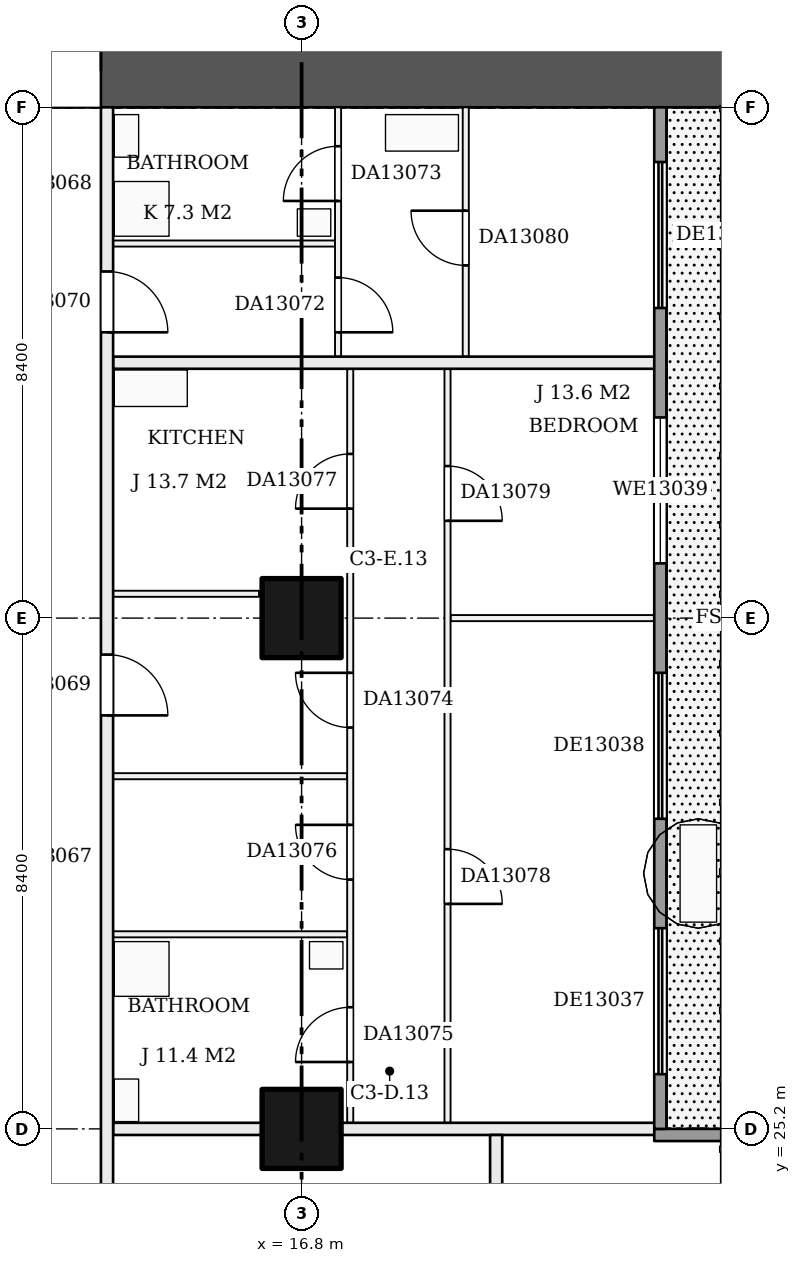
"""IFC4 building model, lengths in metres.
Left out: names, types, materials, properties, quantities, classifications, styles, units other than length and angle.
Written with IfcOpenShell. Run it as: python <this file> out.ifc"""

import sys

from ifc_helpers import new_model, si_unit, direction, frame, frame_2d, origin, origin_2d, place, context, subcontext, project, spatial, rectangle, extrude, element, fill, save


model = new_model("IFC4")
c1 = context("Model", 3, precision=1e-05, world=origin(), true_north=direction((0.0, 1.0)))
c2 = subcontext(c1, "Body", "Model", "MODEL_VIEW")
j1 = project(units=[si_unit("LENGTHUNIT", "METRE"), si_unit("PLANEANGLEUNIT", "RADIAN")], contexts=[c1])
p1 = place(None, origin())
s1 = spatial("IfcSite", under=j1, at=p1, CompositionType="ELEMENT")
p2 = place(p1, origin())
s2 = spatial("IfcBuilding", under=s1, at=p2, CompositionType="ELEMENT")
p3 = place(p2, frame((0.0, 0.0, 56.7)))
s3 = spatial("IfcBuildingStorey", under=s2, at=p3, CompositionType="ELEMENT", Elevation=56.7)
for number, where, z_axis, x_axis in (
    (1, (16.8, 25.2, 0.0), (0.0, 0.0, 1.0), (1.0, 0.0, 0.0)),
    (2, (16.8, 33.6, 0.0), (0.0, 0.0, 1.0), (1.0, 0.0, 0.0)),
):
    element("IfcColumn", number, at=place(p3, frame(where, z_axis=z_axis, x_axis=x_axis)), inside=s3, PredefinedType="COLUMN", context=c2, shape_type="SweptSolid", body=[
        extrude(rectangle(XDim=1.3, YDim=1.3, at=origin_2d()), origin(), (0.0, 0.0, 1.0), 3.22),
    ])
p4 = place(p3, frame((9.6, 42.6, 0.0), z_axis=(0.0, 0.0, 1.0), x_axis=(1.0, 0.0, 0.0)))
e3 = element("IfcWall", 3, at=p4, inside=s3, PredefinedType="SHEAR", context=c2, shape_type="SweptSolid", body=[
    extrude(rectangle(XDim=14.4, YDim=1.2, at=frame_2d((7.2, 0.0))), origin(), (0.0, 0.0, 1.0), 3.22),
])
p5 = place(p4, frame((2.1, 0.0, 0.0)))
e4 = element("IfcOpeningElement", 4, at=p5, cuts=e3, PredefinedType="OPENING", context=c2, shape_type="SweptSolid", body=[
    extrude(rectangle(XDim=1.8, YDim=2.1, at=frame_2d((0.9, 1.05))), frame((0.0, 0.61, 0.0), z_axis=(0.0, -1.0, 0.0), x_axis=(1.0, 0.0, 0.0)), (0.0, 0.0, 1.0), 1.22),
])
p6 = place(p3, frame((13.7, 25.2, 0.0), z_axis=(0.0, 0.0, 1.0), x_axis=(1.0, 0.0, 0.0)))
e5 = element("IfcWall", 5, at=p6, inside=s3, PredefinedType="PARTITIONING", context=c2, shape_type="SweptSolid", body=[
    extrude(rectangle(XDim=9.0, YDim=0.2, at=frame_2d((4.5, 0.0))), origin(), (0.0, 0.0, 1.0), 3.22),
])
for number, where, z_axis, x_axis in (
    (6, (13.7, 28.4, 0.0), (0.0, 0.0, 1.0), (1.0, 0.0, 0.0)),
    (7, (13.7, 31.0, 0.0), (0.0, 0.0, 1.0), (1.0, 0.0, 0.0)),
):
    element("IfcWall", number, at=place(p3, frame(where, z_axis=z_axis, x_axis=x_axis)), inside=s3, PredefinedType="PARTITIONING", context=c2, shape_type="SweptSolid", body=[
        extrude(rectangle(XDim=3.85, YDim=0.1, at=frame_2d((1.925, 0.0))), origin(), (0.0, 0.0, 1.0), 3.22),
    ])
p7 = place(p3, frame((19.25, 33.6, 0.0), z_axis=(0.0, 0.0, 1.0), x_axis=(1.0, 0.0, 0.0)))
e8 = element("IfcWall", 8, at=p7, inside=s3, PredefinedType="PARTITIONING", context=c2, shape_type="SweptSolid", body=[
    extrude(rectangle(XDim=3.45, YDim=0.1, at=frame_2d((1.725, 0.0))), origin(), (0.0, 0.0, 1.0), 3.22),
])
p8 = place(p3, frame((13.7, 34.0, 0.0), z_axis=(0.0, 0.0, 1.0), x_axis=(1.0, 0.0, 0.0)))
e9 = element("IfcWall", 9, at=p8, inside=s3, PredefinedType="PARTITIONING", context=c2, shape_type="SweptSolid", body=[
    extrude(rectangle(XDim=2.4, YDim=0.1, at=frame_2d((1.2, 0.0))), origin(), (0.0, 0.0, 1.0), 3.22),
])
p9 = place(p3, frame((13.7, 37.8, 0.0), z_axis=(0.0, 0.0, 1.0), x_axis=(1.0, 0.0, 0.0)))
e10 = element("IfcWall", 10, at=p9, inside=s3, PredefinedType="PARTITIONING", context=c2, shape_type="SweptSolid", body=[
    extrude(rectangle(XDim=9.0, YDim=0.2, at=frame_2d((4.5, 0.0))), origin(), (0.0, 0.0, 1.0), 3.22),
])
p10 = place(p3, frame((13.7, 39.76, 0.0), z_axis=(0.0, 0.0, 1.0), x_axis=(1.0, 0.0, 0.0)))
e11 = element("IfcWall", 11, at=p10, inside=s3, PredefinedType="PARTITIONING", context=c2, shape_type="SweptSolid", body=[
    extrude(rectangle(XDim=3.65, YDim=0.1, at=frame_2d((1.825, 0.0))), origin(), (0.0, 0.0, 1.0), 3.22),
])
p11 = place(p3, frame((13.6, 20.8, 0.0), z_axis=(0.0, 0.0, 1.0), x_axis=(0.0, 1.0, 0.0)))
e12 = element("IfcWall", 12, at=p11, inside=s3, PredefinedType="PARTITIONING", context=c2, shape_type="SweptSolid", body=[
    extrude(rectangle(XDim=21.2, YDim=0.2, at=frame_2d((10.6, 0.0))), origin(), (0.0, 0.0, 1.0), 3.22),
])
p12 = place(p11, frame((11.2, 0.0, 0.0)))
e13 = element("IfcOpeningElement", 13, at=p12, cuts=e12, PredefinedType="OPENING", context=c2, shape_type="SweptSolid", body=[
    extrude(rectangle(XDim=1.0, YDim=2.1, at=frame_2d((0.5, 1.05))), frame((0.0, 0.11, 0.0), z_axis=(0.0, -1.0, 0.0), x_axis=(1.0, 0.0, 0.0)), (0.0, 0.0, 1.0), 0.22),
])
p13 = place(p11, frame((17.5, 0.0, 0.0)))
e14 = element("IfcOpeningElement", 14, at=p13, cuts=e12, PredefinedType="OPENING", context=c2, shape_type="SweptSolid", body=[
    extrude(rectangle(XDim=1.0, YDim=2.1, at=frame_2d((0.5, 1.05))), frame((0.0, 0.11, 0.0), z_axis=(0.0, -1.0, 0.0), x_axis=(1.0, 0.0, 0.0)), (0.0, 0.0, 1.0), 0.22),
])
p14 = place(p11, frame((1.7, 0.0, 0.0)))
e15 = element("IfcOpeningElement", 15, at=p14, cuts=e12, PredefinedType="OPENING", context=c2, shape_type="SweptSolid", body=[
    extrude(rectangle(XDim=1.0, YDim=2.1, at=frame_2d((0.5, 1.05))), frame((0.0, 0.11, 0.0), z_axis=(0.0, -1.0, 0.0), x_axis=(1.0, 0.0, 0.0)), (0.0, 0.0, 1.0), 0.22),
])
p15 = place(p3, frame((17.4, 37.9, 0.0), z_axis=(0.0, 0.0, 1.0), x_axis=(0.0, 1.0, 0.0)))
e16 = element("IfcWall", 16, at=p15, inside=s3, PredefinedType="PARTITIONING", context=c2, shape_type="SweptSolid", body=[
    extrude(rectangle(XDim=4.1, YDim=0.1, at=frame_2d((2.05, 0.0))), origin(), (0.0, 0.0, 1.0), 3.22),
])
p16 = place(p15, frame((0.4, 0.0, 0.0)))
e17 = element("IfcOpeningElement", 17, at=p16, cuts=e16, PredefinedType="OPENING", context=c2, shape_type="SweptSolid", body=[
    extrude(rectangle(XDim=0.9, YDim=2.1, at=frame_2d((0.45, 1.05))), frame((0.0, 0.06, 0.0), z_axis=(0.0, -1.0, 0.0), x_axis=(1.0, 0.0, 0.0)), (0.0, 0.0, 1.0), 0.12),
])
p17 = place(p15, frame((2.56, 0.0, 0.0)))
e18 = element("IfcOpeningElement", 18, at=p17, cuts=e16, PredefinedType="OPENING", context=c2, shape_type="SweptSolid", body=[
    extrude(rectangle(XDim=0.9, YDim=2.1, at=frame_2d((0.45, 1.05))), frame((0.0, 0.06, 0.0), z_axis=(0.0, -1.0, 0.0), x_axis=(1.0, 0.0, 0.0)), (0.0, 0.0, 1.0), 0.12),
])
p18 = place(p3, frame((17.6, 25.3, 0.0), z_axis=(0.0, 0.0, 1.0), x_axis=(0.0, 1.0, 0.0)))
e19 = element("IfcWall", 19, at=p18, inside=s3, PredefinedType="PARTITIONING", context=c2, shape_type="SweptSolid", body=[
    extrude(rectangle(XDim=12.4, YDim=0.1, at=frame_2d((6.2, 0.0))), origin(), (0.0, 0.0, 1.0), 3.22),
])
p19 = place(p18, frame((6.5, 0.0, 0.0)))
e20 = element("IfcOpeningElement", 20, at=p19, cuts=e19, PredefinedType="OPENING", context=c2, shape_type="SweptSolid", body=[
    extrude(rectangle(XDim=0.9, YDim=2.1, at=frame_2d((0.45, 1.05))), frame((0.0, 0.06, 0.0), z_axis=(0.0, -1.0, 0.0), x_axis=(1.0, 0.0, 0.0)), (0.0, 0.0, 1.0), 0.12),
])
p20 = place(p18, frame((1.0, 0.0, 0.0)))
e21 = element("IfcOpeningElement", 21, at=p20, cuts=e19, PredefinedType="OPENING", context=c2, shape_type="SweptSolid", body=[
    extrude(rectangle(XDim=0.9, YDim=2.1, at=frame_2d((0.45, 1.05))), frame((0.0, 0.06, 0.0), z_axis=(0.0, -1.0, 0.0), x_axis=(1.0, 0.0, 0.0)), (0.0, 0.0, 1.0), 0.12),
])
p21 = place(p18, frame((4.0, 0.0, 0.0)))
e22 = element("IfcOpeningElement", 22, at=p21, cuts=e19, PredefinedType="OPENING", context=c2, shape_type="SweptSolid", body=[
    extrude(rectangle(XDim=0.9, YDim=2.1, at=frame_2d((0.45, 1.05))), frame((0.0, 0.06, 0.0), z_axis=(0.0, -1.0, 0.0), x_axis=(1.0, 0.0, 0.0)), (0.0, 0.0, 1.0), 0.12),
])
p22 = place(p18, frame((10.1, 0.0, 0.0)))
e23 = element("IfcOpeningElement", 23, at=p22, cuts=e19, PredefinedType="OPENING", context=c2, shape_type="SweptSolid", body=[
    extrude(rectangle(XDim=0.9, YDim=2.1, at=frame_2d((0.45, 1.05))), frame((0.0, 0.06, 0.0), z_axis=(0.0, -1.0, 0.0), x_axis=(1.0, 0.0, 0.0)), (0.0, 0.0, 1.0), 0.12),
])
p23 = place(p3, frame((19.2, 25.3, 0.0), z_axis=(0.0, 0.0, 1.0), x_axis=(0.0, 1.0, 0.0)))
e24 = element("IfcWall", 24, at=p23, inside=s3, PredefinedType="PARTITIONING", context=c2, shape_type="SweptSolid", body=[
    extrude(rectangle(XDim=12.4, YDim=0.1, at=frame_2d((6.2, 0.0))), origin(), (0.0, 0.0, 1.0), 3.22),
])
p24 = place(p23, frame((3.6, 0.0, 0.0)))
e25 = element("IfcOpeningElement", 25, at=p24, cuts=e24, PredefinedType="OPENING", context=c2, shape_type="SweptSolid", body=[
    extrude(rectangle(XDim=0.9, YDim=2.1, at=frame_2d((0.45, 1.05))), frame((0.0, 0.06, 0.0), z_axis=(0.0, -1.0, 0.0), x_axis=(1.0, 0.0, 0.0)), (0.0, 0.0, 1.0), 0.12),
])
p25 = place(p23, frame((9.9, 0.0, 0.0)))
e26 = element("IfcOpeningElement", 26, at=p25, cuts=e24, PredefinedType="OPENING", context=c2, shape_type="SweptSolid", body=[
    extrude(rectangle(XDim=0.9, YDim=2.1, at=frame_2d((0.45, 1.05))), frame((0.0, 0.06, 0.0), z_axis=(0.0, -1.0, 0.0), x_axis=(1.0, 0.0, 0.0)), (0.0, 0.0, 1.0), 0.12),
])
p26 = place(p3, frame((19.5, 37.9, 0.0), z_axis=(0.0, 0.0, 1.0), x_axis=(0.0, 1.0, 0.0)))
e27 = element("IfcWall", 27, at=p26, inside=s3, PredefinedType="PARTITIONING", context=c2, shape_type="SweptSolid", body=[
    extrude(rectangle(XDim=4.1, YDim=0.1, at=frame_2d((2.05, 0.0))), origin(), (0.0, 0.0, 1.0), 3.22),
])
p27 = place(p26, frame((1.5, 0.0, 0.0)))
e28 = element("IfcOpeningElement", 28, at=p27, cuts=e27, PredefinedType="OPENING", context=c2, shape_type="SweptSolid", body=[
    extrude(rectangle(XDim=0.9, YDim=2.1, at=frame_2d((0.45, 1.05))), frame((0.0, 0.06, 0.0), z_axis=(0.0, -1.0, 0.0), x_axis=(1.0, 0.0, 0.0)), (0.0, 0.0, 1.0), 0.12),
])
p28 = place(p3, frame((20.0, 13.7, 0.0), z_axis=(0.0, 0.0, 1.0), x_axis=(0.0, 1.0, 0.0)))
e29 = element("IfcWall", 29, at=p28, inside=s3, PredefinedType="PARTITIONING", context=c2, shape_type="SweptSolid", body=[
    extrude(rectangle(XDim=11.4, YDim=0.2, at=frame_2d((5.7, 0.0))), origin(), (0.0, 0.0, 1.0), 3.22),
])
p29 = place(p3, frame((24.5, 25.1, 0.0), z_axis=(0.0, 0.0, 1.0), x_axis=(-1.0, 0.0, 0.0)))
e30 = element("IfcWall", 30, at=p29, inside=s3, PredefinedType="SOLIDWALL", context=c2, shape_type="SweptSolid", body=[
    extrude(rectangle(XDim=1.9, YDim=0.2, at=frame_2d((0.95, 0.0))), origin(), (0.0, 0.0, 1.0), 3.22),
])
p30 = place(p3, frame((22.7, 25.2, 0.0), z_axis=(0.0, 0.0, 1.0), x_axis=(0.0, 1.0, 0.0)))
e31 = element("IfcWall", 31, at=p30, inside=s3, PredefinedType="SOLIDWALL", context=c2, shape_type="SweptSolid", body=[
    extrude(rectangle(XDim=16.8, YDim=0.2, at=frame_2d((8.4, 0.0))), origin(), (0.0, 0.0, 1.0), 3.22),
])
p31 = place(p30, frame((0.9, 0.0, 0.0)))
e32 = element("IfcOpeningElement", 32, at=p31, cuts=e31, PredefinedType="OPENING", context=c2, shape_type="SweptSolid", body=[
    extrude(rectangle(XDim=2.4, YDim=2.2, at=frame_2d((1.2, 1.1))), frame((0.0, 0.11, 0.0), z_axis=(0.0, -1.0, 0.0), x_axis=(1.0, 0.0, 0.0)), (0.0, 0.0, 1.0), 0.22),
])
p32 = place(p30, frame((5.1, 0.0, 0.0)))
e33 = element("IfcOpeningElement", 33, at=p32, cuts=e31, PredefinedType="OPENING", context=c2, shape_type="SweptSolid", body=[
    extrude(rectangle(XDim=2.4, YDim=2.2, at=frame_2d((1.2, 1.1))), frame((0.0, 0.11, 0.0), z_axis=(0.0, -1.0, 0.0), x_axis=(1.0, 0.0, 0.0)), (0.0, 0.0, 1.0), 0.22),
])
p33 = place(p30, frame((9.3, 0.0, 0.9)))
e34 = element("IfcOpeningElement", 34, at=p33, cuts=e31, PredefinedType="OPENING", context=c2, shape_type="SweptSolid", body=[
    extrude(rectangle(XDim=2.4, YDim=1.5, at=frame_2d((1.2, 0.75))), frame((0.0, 0.11, 0.0), z_axis=(0.0, -1.0, 0.0), x_axis=(1.0, 0.0, 0.0)), (0.0, 0.0, 1.0), 0.22),
])
p34 = place(p30, frame((13.5, 0.0, 0.0)))
e35 = element("IfcOpeningElement", 35, at=p34, cuts=e31, PredefinedType="OPENING", context=c2, shape_type="SweptSolid", body=[
    extrude(rectangle(XDim=2.4, YDim=2.2, at=frame_2d((1.2, 1.1))), frame((0.0, 0.11, 0.0), z_axis=(0.0, -1.0, 0.0), x_axis=(1.0, 0.0, 0.0)), (0.0, 0.0, 1.0), 0.22),
])
p35 = place(p5, origin())
e36 = element("IfcDoor", 36, at=p35, inside=s3, OperationType="DOUBLE_DOOR_SINGLE_SWING", PredefinedType="DOOR", context=c2, shape_type="SweptSolid", body=[
    extrude(rectangle(XDim=1.8, YDim=2.1, at=frame_2d((0.9, 1.05))), frame((0.0, 0.025, 0.0), z_axis=(0.0, -1.0, 0.0), x_axis=(1.0, 0.0, 0.0)), (0.0, 0.0, 1.0), 0.05),
])
fill(e4, e36)
p36 = place(p12, frame((1.0, 0.0, 0.0), z_axis=(0.0, 0.0, 1.0), x_axis=(-1.0, 0.0, 0.0)))
e37 = element("IfcDoor", 37, at=p36, inside=s3, OperationType="SINGLE_SWING_RIGHT", PredefinedType="DOOR", context=c2, shape_type="SweptSolid", body=[
    extrude(rectangle(XDim=1.0, YDim=2.1, at=frame_2d((0.5, 1.05))), frame((0.0, 0.025, 0.0), z_axis=(0.0, -1.0, 0.0), x_axis=(1.0, 0.0, 0.0)), (0.0, 0.0, 1.0), 0.05),
])
fill(e13, e37)
p37 = place(p13, frame((1.0, 0.0, 0.0), z_axis=(0.0, 0.0, 1.0), x_axis=(-1.0, 0.0, 0.0)))
e38 = element("IfcDoor", 38, at=p37, inside=s3, OperationType="SINGLE_SWING_RIGHT", PredefinedType="DOOR", context=c2, shape_type="SweptSolid", body=[
    extrude(rectangle(XDim=1.0, YDim=2.1, at=frame_2d((0.5, 1.05))), frame((0.0, 0.025, 0.0), z_axis=(0.0, -1.0, 0.0), x_axis=(1.0, 0.0, 0.0)), (0.0, 0.0, 1.0), 0.05),
])
fill(e14, e38)
p38 = place(p16, frame((0.9, 0.0, 0.0), z_axis=(0.0, 0.0, 1.0), x_axis=(-1.0, 0.0, 0.0)))
e39 = element("IfcDoor", 39, at=p38, inside=s3, OperationType="SINGLE_SWING_RIGHT", PredefinedType="DOOR", context=c2, shape_type="SweptSolid", body=[
    extrude(rectangle(XDim=0.9, YDim=2.1, at=frame_2d((0.45, 1.05))), frame((0.0, 0.025, 0.0), z_axis=(0.0, -1.0, 0.0), x_axis=(1.0, 0.0, 0.0)), (0.0, 0.0, 1.0), 0.05),
])
fill(e17, e39)
p39 = place(p17, origin())
e40 = element("IfcDoor", 40, at=p39, inside=s3, OperationType="SINGLE_SWING_LEFT", PredefinedType="DOOR", context=c2, shape_type="SweptSolid", body=[
    extrude(rectangle(XDim=0.9, YDim=2.1, at=frame_2d((0.45, 1.05))), frame((0.0, 0.025, 0.0), z_axis=(0.0, -1.0, 0.0), x_axis=(1.0, 0.0, 0.0)), (0.0, 0.0, 1.0), 0.05),
])
fill(e18, e40)
p40 = place(p19, origin())
e41 = element("IfcDoor", 41, at=p40, inside=s3, OperationType="SINGLE_SWING_RIGHT", PredefinedType="DOOR", context=c2, shape_type="SweptSolid", body=[
    extrude(rectangle(XDim=0.9, YDim=2.1, at=frame_2d((0.45, 1.05))), frame((0.0, 0.025, 0.0), z_axis=(0.0, -1.0, 0.0), x_axis=(1.0, 0.0, 0.0)), (0.0, 0.0, 1.0), 0.05),
])
fill(e20, e41)
p41 = place(p20, origin())
e42 = element("IfcDoor", 42, at=p41, inside=s3, OperationType="SINGLE_SWING_LEFT", PredefinedType="DOOR", context=c2, shape_type="SweptSolid", body=[
    extrude(rectangle(XDim=0.9, YDim=2.1, at=frame_2d((0.45, 1.05))), frame((0.0, 0.025, 0.0), z_axis=(0.0, -1.0, 0.0), x_axis=(1.0, 0.0, 0.0)), (0.0, 0.0, 1.0), 0.05),
])
fill(e21, e42)
p42 = place(p21, origin())
e43 = element("IfcDoor", 43, at=p42, inside=s3, OperationType="SINGLE_SWING_RIGHT", PredefinedType="DOOR", context=c2, shape_type="SweptSolid", body=[
    extrude(rectangle(XDim=0.9, YDim=2.1, at=frame_2d((0.45, 1.05))), frame((0.0, 0.025, 0.0), z_axis=(0.0, -1.0, 0.0), x_axis=(1.0, 0.0, 0.0)), (0.0, 0.0, 1.0), 0.05),
])
fill(e22, e43)
p43 = place(p22, origin())
e44 = element("IfcDoor", 44, at=p43, inside=s3, OperationType="SINGLE_SWING_LEFT", PredefinedType="DOOR", context=c2, shape_type="SweptSolid", body=[
    extrude(rectangle(XDim=0.9, YDim=2.1, at=frame_2d((0.45, 1.05))), frame((0.0, 0.025, 0.0), z_axis=(0.0, -1.0, 0.0), x_axis=(1.0, 0.0, 0.0)), (0.0, 0.0, 1.0), 0.05),
])
fill(e23, e44)
p44 = place(p24, frame((0.9, 0.0, 0.0), z_axis=(0.0, 0.0, 1.0), x_axis=(-1.0, 0.0, 0.0)))
e45 = element("IfcDoor", 45, at=p44, inside=s3, OperationType="SINGLE_SWING_RIGHT", PredefinedType="DOOR", context=c2, shape_type="SweptSolid", body=[
    extrude(rectangle(XDim=0.9, YDim=2.1, at=frame_2d((0.45, 1.05))), frame((0.0, 0.025, 0.0), z_axis=(0.0, -1.0, 0.0), x_axis=(1.0, 0.0, 0.0)), (0.0, 0.0, 1.0), 0.05),
])
fill(e25, e45)
p45 = place(p25, frame((0.9, 0.0, 0.0), z_axis=(0.0, 0.0, 1.0), x_axis=(-1.0, 0.0, 0.0)))
e46 = element("IfcDoor", 46, at=p45, inside=s3, OperationType="SINGLE_SWING_RIGHT", PredefinedType="DOOR", context=c2, shape_type="SweptSolid", body=[
    extrude(rectangle(XDim=0.9, YDim=2.1, at=frame_2d((0.45, 1.05))), frame((0.0, 0.025, 0.0), z_axis=(0.0, -1.0, 0.0), x_axis=(1.0, 0.0, 0.0)), (0.0, 0.0, 1.0), 0.05),
])
fill(e26, e46)
p46 = place(p27, origin())
e47 = element("IfcDoor", 47, at=p46, inside=s3, OperationType="SINGLE_SWING_RIGHT", PredefinedType="DOOR", context=c2, shape_type="SweptSolid", body=[
    extrude(rectangle(XDim=0.9, YDim=2.1, at=frame_2d((0.45, 1.05))), frame((0.0, 0.025, 0.0), z_axis=(0.0, -1.0, 0.0), x_axis=(1.0, 0.0, 0.0)), (0.0, 0.0, 1.0), 0.05),
])
fill(e28, e47)
p47 = place(p31, origin())
e48 = element("IfcDoor", 48, at=p47, inside=s3, OperationType="DOUBLE_DOOR_SLIDING", PredefinedType="DOOR", context=c2, shape_type="SweptSolid", body=[
    extrude(rectangle(XDim=2.4, YDim=2.2, at=frame_2d((1.2, 1.1))), frame((0.0, 0.025, 0.0), z_axis=(0.0, -1.0, 0.0), x_axis=(1.0, 0.0, 0.0)), (0.0, 0.0, 1.0), 0.05),
])
fill(e32, e48)
p48 = place(p32, origin())
e49 = element("IfcDoor", 49, at=p48, inside=s3, OperationType="DOUBLE_DOOR_SLIDING", PredefinedType="DOOR", context=c2, shape_type="SweptSolid", body=[
    extrude(rectangle(XDim=2.4, YDim=2.2, at=frame_2d((1.2, 1.1))), frame((0.0, 0.025, 0.0), z_axis=(0.0, -1.0, 0.0), x_axis=(1.0, 0.0, 0.0)), (0.0, 0.0, 1.0), 0.05),
])
fill(e33, e49)
p49 = place(p33, origin())
e50 = element("IfcWindow", 50, at=p49, inside=s3, PartitioningType="SINGLE_PANEL", PredefinedType="WINDOW", context=c2, shape_type="SweptSolid", body=[
    extrude(rectangle(XDim=2.4, YDim=1.5, at=frame_2d((1.2, 0.75))), frame((0.0, 0.03, 0.0), z_axis=(0.0, -1.0, 0.0), x_axis=(1.0, 0.0, 0.0)), (0.0, 0.0, 1.0), 0.06),
])
fill(e34, e50)
p50 = place(p34, origin())
e51 = element("IfcDoor", 51, at=p50, inside=s3, OperationType="DOUBLE_DOOR_SLIDING", PredefinedType="DOOR", context=c2, shape_type="SweptSolid", body=[
    extrude(rectangle(XDim=2.4, YDim=2.2, at=frame_2d((1.2, 1.1))), frame((0.0, 0.025, 0.0), z_axis=(0.0, -1.0, 0.0), x_axis=(1.0, 0.0, 0.0)), (0.0, 0.0, 1.0), 0.05),
])
fill(e35, e51)
save(model, sys.argv[1])
